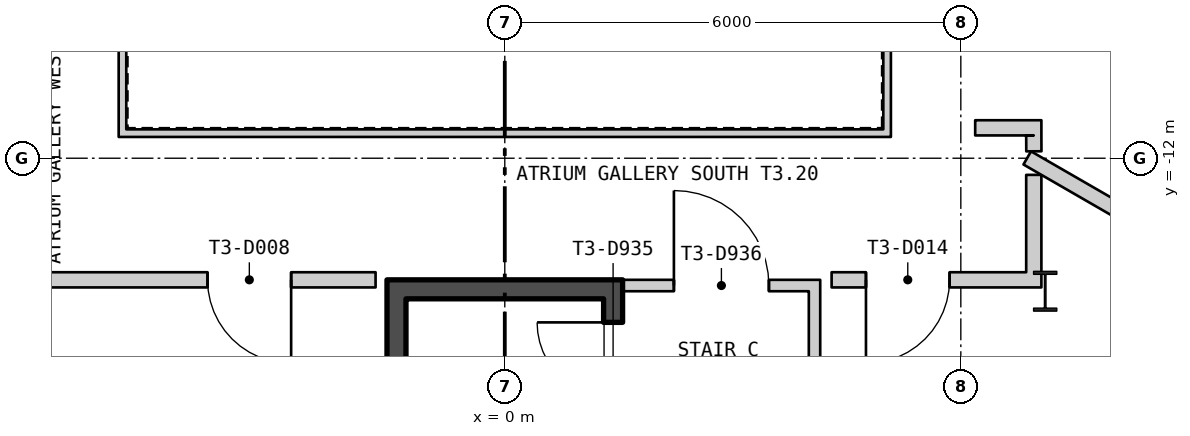
"""IFC4 building model, lengths in metres.
Left out: names, types, materials, properties, quantities, classifications, styles, units other than length and angle.
Written with IfcOpenShell. Run it as: python <this file> out.ifc"""

import sys

from ifc_helpers import new_model, si_unit, direction, frame, frame_2d, origin, origin_2d, place, context, subcontext, project, spatial, polyline, rectangle, i_section, outline, extrude, element, fill, save


model = new_model("IFC4")
c1 = context("Model", 3, precision=1e-05, world=origin(), true_north=direction((0.0, 1.0)))
c2 = subcontext(c1, "Body", "Model", "MODEL_VIEW")
j1 = project(units=[si_unit("LENGTHUNIT", "METRE"), si_unit("PLANEANGLEUNIT", "RADIAN")], contexts=[c1])
p1 = place(None, origin())
s1 = spatial("IfcSite", under=j1, at=p1, CompositionType="ELEMENT")
p2 = place(p1, origin())
s2 = spatial("IfcBuilding", under=s1, at=p2, CompositionType="ELEMENT")
p3 = place(p2, frame((0.0, 0.0, 186.6)))
s3 = spatial("IfcBuildingStorey", under=s2, at=p3, CompositionType="ELEMENT", Elevation=186.6)
p4 = place(p3, frame((7.11, -13.75, 0.0), z_axis=(0.0, 0.0, 1.0), x_axis=(1.0, 0.0, 0.0)))
e1 = element("IfcColumn", 1, at=p4, inside=s3, PredefinedType="COLUMN", context=c2, shape_type="SweptSolid", body=[
    extrude(i_section(OverallWidth=0.306, OverallDepth=0.524, WebThickness=0.021, FlangeThickness=0.04, at=origin_2d()), origin(), (0.0, 0.0, 1.0), 6.0),
])
p5 = place(p3, frame((-26.67, 13.393, -0.18), z_axis=(0.0, 0.0, 1.0), x_axis=(0.500000711659, -0.866024992908, 0.0)))
e2 = element("IfcWall", 2, at=p5, inside=s3, PredefinedType="SOLIDWALL", context=c2, shape_type="SweptSolid", body=[
    extrude(outline(polyline([(-0.13, -0.225), (45.87, -0.225), (45.61, 0.225), (0.13, 0.225), (-0.13, -0.225)])), origin(), (0.0, 0.0, 1.0), 6.0),
])
p6 = place(p5, frame((1.424, 0.0, 1.38)))
e3 = element("IfcOpeningElement", 3, at=p6, cuts=e2, PredefinedType="OPENING", context=c2, shape_type="SweptSolid", body=[
    extrude(rectangle(XDim=2.4, YDim=3.6, at=frame_2d((1.2, 1.8))), frame((0.0, 0.235, 0.0), z_axis=(0.0, -1.0, 0.0), x_axis=(1.0, 0.0, 0.0)), (0.0, 0.0, 1.0), 0.47),
])
p7 = place(p5, frame((5.893, 0.0, 1.38)))
e4 = element("IfcOpeningElement", 4, at=p7, cuts=e2, PredefinedType="OPENING", context=c2, shape_type="SweptSolid", body=[
    extrude(rectangle(XDim=2.4, YDim=3.6, at=frame_2d((1.2, 1.8))), frame((0.0, 0.235, 0.0), z_axis=(0.0, -1.0, 0.0), x_axis=(1.0, 0.0, 0.0)), (0.0, 0.0, 1.0), 0.47),
])
p8 = place(p5, frame((10.401, 0.0, 1.38)))
e5 = element("IfcOpeningElement", 5, at=p8, cuts=e2, PredefinedType="OPENING", context=c2, shape_type="SweptSolid", body=[
    extrude(rectangle(XDim=2.4, YDim=3.6, at=frame_2d((1.2, 1.8))), frame((0.0, 0.235, 0.0), z_axis=(0.0, -1.0, 0.0), x_axis=(1.0, 0.0, 0.0)), (0.0, 0.0, 1.0), 0.47),
])
p9 = place(p5, frame((14.909, 0.0, 1.38)))
e6 = element("IfcOpeningElement", 6, at=p9, cuts=e2, PredefinedType="OPENING", context=c2, shape_type="SweptSolid", body=[
    extrude(rectangle(XDim=2.4, YDim=3.6, at=frame_2d((1.2, 1.8))), frame((0.0, 0.235, 0.0), z_axis=(0.0, -1.0, 0.0), x_axis=(1.0, 0.0, 0.0)), (0.0, 0.0, 1.0), 0.47),
])
p10 = place(p5, frame((19.416, 0.0, 1.38)))
e7 = element("IfcOpeningElement", 7, at=p10, cuts=e2, PredefinedType="OPENING", context=c2, shape_type="SweptSolid", body=[
    extrude(rectangle(XDim=2.4, YDim=3.6, at=frame_2d((1.2, 1.8))), frame((0.0, 0.235, 0.0), z_axis=(0.0, -1.0, 0.0), x_axis=(1.0, 0.0, 0.0)), (0.0, 0.0, 1.0), 0.47),
])
p11 = place(p5, frame((23.924, 0.0, 1.38)))
e8 = element("IfcOpeningElement", 8, at=p11, cuts=e2, PredefinedType="OPENING", context=c2, shape_type="SweptSolid", body=[
    extrude(rectangle(XDim=2.4, YDim=3.6, at=frame_2d((1.2, 1.8))), frame((0.0, 0.235, 0.0), z_axis=(0.0, -1.0, 0.0), x_axis=(1.0, 0.0, 0.0)), (0.0, 0.0, 1.0), 0.47),
])
p12 = place(p5, frame((28.431, 0.0, 1.38)))
e9 = element("IfcOpeningElement", 9, at=p12, cuts=e2, PredefinedType="OPENING", context=c2, shape_type="SweptSolid", body=[
    extrude(rectangle(XDim=2.4, YDim=3.6, at=frame_2d((1.2, 1.8))), frame((0.0, 0.235, 0.0), z_axis=(0.0, -1.0, 0.0), x_axis=(1.0, 0.0, 0.0)), (0.0, 0.0, 1.0), 0.47),
])
p13 = place(p5, frame((32.939, 0.0, 1.38)))
e10 = element("IfcOpeningElement", 10, at=p13, cuts=e2, PredefinedType="OPENING", context=c2, shape_type="SweptSolid", body=[
    extrude(rectangle(XDim=2.4, YDim=3.6, at=frame_2d((1.2, 1.8))), frame((0.0, 0.235, 0.0), z_axis=(0.0, -1.0, 0.0), x_axis=(1.0, 0.0, 0.0)), (0.0, 0.0, 1.0), 0.47),
])
p14 = place(p5, frame((37.447, 0.0, 1.38)))
e11 = element("IfcOpeningElement", 11, at=p14, cuts=e2, PredefinedType="OPENING", context=c2, shape_type="SweptSolid", body=[
    extrude(rectangle(XDim=2.4, YDim=3.6, at=frame_2d((1.2, 1.8))), frame((0.0, 0.235, 0.0), z_axis=(0.0, -1.0, 0.0), x_axis=(1.0, 0.0, 0.0)), (0.0, 0.0, 1.0), 0.47),
])
p15 = place(p5, frame((41.916, 0.0, 1.38)))
e12 = element("IfcOpeningElement", 12, at=p15, cuts=e2, PredefinedType="OPENING", context=c2, shape_type="SweptSolid", body=[
    extrude(rectangle(XDim=2.4, YDim=3.6, at=frame_2d((1.2, 1.8))), frame((0.0, 0.235, 0.0), z_axis=(0.0, -1.0, 0.0), x_axis=(1.0, 0.0, 0.0)), (0.0, 0.0, 1.0), 0.47),
])
p16 = place(p3, frame((3.8, -26.219, -0.18), z_axis=(0.0, 0.0, 1.0), x_axis=(0.500000711659, 0.866024992908, 0.0)))
e13 = element("IfcWall", 13, at=p16, inside=s3, PredefinedType="SOLIDWALL", context=c2, shape_type="SweptSolid", body=[
    extrude(outline(polyline([(-0.13, -0.225), (45.87, -0.225), (45.61, 0.225), (0.13, 0.225), (-0.13, -0.225)])), origin(), (0.0, 0.0, 1.0), 6.0),
])
p17 = place(p16, frame((1.424, 0.0, 1.38)))
e14 = element("IfcOpeningElement", 14, at=p17, cuts=e13, PredefinedType="OPENING", context=c2, shape_type="SweptSolid", body=[
    extrude(rectangle(XDim=2.4, YDim=3.6, at=frame_2d((1.2, 1.8))), frame((0.0, 0.235, 0.0), z_axis=(0.0, -1.0, 0.0), x_axis=(1.0, 0.0, 0.0)), (0.0, 0.0, 1.0), 0.47),
])
p18 = place(p16, frame((5.893, 0.0, 1.38)))
e15 = element("IfcOpeningElement", 15, at=p18, cuts=e13, PredefinedType="OPENING", context=c2, shape_type="SweptSolid", body=[
    extrude(rectangle(XDim=2.4, YDim=3.6, at=frame_2d((1.2, 1.8))), frame((0.0, 0.235, 0.0), z_axis=(0.0, -1.0, 0.0), x_axis=(1.0, 0.0, 0.0)), (0.0, 0.0, 1.0), 0.47),
])
p19 = place(p16, frame((10.401, 0.0, 1.38)))
e16 = element("IfcOpeningElement", 16, at=p19, cuts=e13, PredefinedType="OPENING", context=c2, shape_type="SweptSolid", body=[
    extrude(rectangle(XDim=2.4, YDim=3.6, at=frame_2d((1.2, 1.8))), frame((0.0, 0.235, 0.0), z_axis=(0.0, -1.0, 0.0), x_axis=(1.0, 0.0, 0.0)), (0.0, 0.0, 1.0), 0.47),
])
p20 = place(p16, frame((14.909, 0.0, 1.38)))
e17 = element("IfcOpeningElement", 17, at=p20, cuts=e13, PredefinedType="OPENING", context=c2, shape_type="SweptSolid", body=[
    extrude(rectangle(XDim=2.4, YDim=3.6, at=frame_2d((1.2, 1.8))), frame((0.0, 0.235, 0.0), z_axis=(0.0, -1.0, 0.0), x_axis=(1.0, 0.0, 0.0)), (0.0, 0.0, 1.0), 0.47),
])
p21 = place(p16, frame((19.416, 0.0, 1.38)))
e18 = element("IfcOpeningElement", 18, at=p21, cuts=e13, PredefinedType="OPENING", context=c2, shape_type="SweptSolid", body=[
    extrude(rectangle(XDim=2.4, YDim=3.6, at=frame_2d((1.2, 1.8))), frame((0.0, 0.235, 0.0), z_axis=(0.0, -1.0, 0.0), x_axis=(1.0, 0.0, 0.0)), (0.0, 0.0, 1.0), 0.47),
])
p22 = place(p16, frame((23.924, 0.0, 1.38)))
e19 = element("IfcOpeningElement", 19, at=p22, cuts=e13, PredefinedType="OPENING", context=c2, shape_type="SweptSolid", body=[
    extrude(rectangle(XDim=2.4, YDim=3.6, at=frame_2d((1.2, 1.8))), frame((0.0, 0.235, 0.0), z_axis=(0.0, -1.0, 0.0), x_axis=(1.0, 0.0, 0.0)), (0.0, 0.0, 1.0), 0.47),
])
p23 = place(p16, frame((28.431, 0.0, 1.38)))
e20 = element("IfcOpeningElement", 20, at=p23, cuts=e13, PredefinedType="OPENING", context=c2, shape_type="SweptSolid", body=[
    extrude(rectangle(XDim=2.4, YDim=3.6, at=frame_2d((1.2, 1.8))), frame((0.0, 0.235, 0.0), z_axis=(0.0, -1.0, 0.0), x_axis=(1.0, 0.0, 0.0)), (0.0, 0.0, 1.0), 0.47),
])
p24 = place(p16, frame((32.939, 0.0, 1.38)))
e21 = element("IfcOpeningElement", 21, at=p24, cuts=e13, PredefinedType="OPENING", context=c2, shape_type="SweptSolid", body=[
    extrude(rectangle(XDim=2.4, YDim=3.6, at=frame_2d((1.2, 1.8))), frame((0.0, 0.235, 0.0), z_axis=(0.0, -1.0, 0.0), x_axis=(1.0, 0.0, 0.0)), (0.0, 0.0, 1.0), 0.47),
])
p25 = place(p16, frame((37.447, 0.0, 1.38)))
e22 = element("IfcOpeningElement", 22, at=p25, cuts=e13, PredefinedType="OPENING", context=c2, shape_type="SweptSolid", body=[
    extrude(rectangle(XDim=2.4, YDim=3.6, at=frame_2d((1.2, 1.8))), frame((0.0, 0.235, 0.0), z_axis=(0.0, -1.0, 0.0), x_axis=(1.0, 0.0, 0.0)), (0.0, 0.0, 1.0), 0.47),
])
p26 = place(p16, frame((41.916, 0.0, 1.38)))
e23 = element("IfcOpeningElement", 23, at=p26, cuts=e13, PredefinedType="OPENING", context=c2, shape_type="SweptSolid", body=[
    extrude(rectangle(XDim=2.4, YDim=3.6, at=frame_2d((1.2, 1.8))), frame((0.0, 0.235, 0.0), z_axis=(0.0, -1.0, 0.0), x_axis=(1.0, 0.0, 0.0)), (0.0, 0.0, 1.0), 0.47),
])
p27 = place(p3, frame((-5.08, -11.67, 0.0), z_axis=(0.0, 0.0, 1.0), x_axis=(1.0, 0.0, 0.0)))
e24 = element("IfcWall", 24, at=p27, inside=s3, PredefinedType="PARTITIONING", context=c2, shape_type="SweptSolid", body=[
    extrude(rectangle(XDim=10.16, YDim=0.1, at=frame_2d((5.08, 0.0))), origin(), (0.0, 0.0, 1.0), 5.8),
])
for number, where, z_axis, x_axis in (
    (25, (5.03, -11.62, 0.0), (0.0, 0.0, 1.0), (0.0, 1.0, 0.0)),
    (26, (-5.03, -3.58, 0.0), (0.0, 0.0, 1.0), (0.0, -1.0, 0.0)),
):
    element("IfcWall", number, at=place(p3, frame(where, z_axis=z_axis, x_axis=x_axis)), inside=s3, PredefinedType="PARTITIONING", context=c2, shape_type="SweptSolid", body=[
        extrude(rectangle(XDim=8.04, YDim=0.1, at=frame_2d((4.02, 0.0))), origin(), (0.0, 0.0, 1.0), 5.8),
    ])
p28 = place(p3, frame((-1.425, -21.05, 0.0), z_axis=(0.0, 0.0, 1.0), x_axis=(0.0, 1.0, 0.0)))
e27 = element("IfcWall", 27, at=p28, inside=s3, PredefinedType="SHEAR", context=c2, shape_type="SweptSolid", body=[
    extrude(rectangle(XDim=7.2, YDim=0.25, at=frame_2d((3.6, 0.0))), origin(), (0.0, 0.0, 1.0), 5.8),
])
p29 = place(p3, frame((1.425, -21.05, 0.0), z_axis=(0.0, 0.0, 1.0), x_axis=(0.0, 1.0, 0.0)))
e28 = element("IfcWall", 28, at=p29, inside=s3, PredefinedType="SHEAR", context=c2, shape_type="SweptSolid", body=[
    extrude(rectangle(XDim=7.2, YDim=0.25, at=frame_2d((3.6, 0.0))), origin(), (0.0, 0.0, 1.0), 5.8),
])
p30 = place(p29, frame((5.89, 0.0, 0.0)))
e29 = element("IfcOpeningElement", 29, at=p30, cuts=e28, PredefinedType="OPENING", context=c2, shape_type="SweptSolid", body=[
    extrude(rectangle(XDim=1.0, YDim=2.1, at=frame_2d((0.5, 1.05))), frame((0.0, 0.135, 0.0), z_axis=(0.0, -1.0, 0.0), x_axis=(1.0, 0.0, 0.0)), (0.0, 0.0, 1.0), 0.27),
])
p31 = place(p3, frame((-1.55, -13.725, 0.0), z_axis=(0.0, 0.0, 1.0), x_axis=(1.0, 0.0, 0.0)))
e30 = element("IfcWall", 30, at=p31, inside=s3, PredefinedType="SHEAR", context=c2, shape_type="SweptSolid", body=[
    extrude(rectangle(XDim=3.1, YDim=0.25, at=frame_2d((1.55, 0.0))), origin(), (0.0, 0.0, 1.0), 5.8),
])
p32 = place(p3, frame((4.075, -16.15, 0.0), z_axis=(0.0, 0.0, 1.0), x_axis=(0.0, 1.0, 0.0)))
e31 = element("IfcWall", 31, at=p32, inside=s3, PredefinedType="PARTITIONING", context=c2, shape_type="SweptSolid", body=[
    extrude(rectangle(XDim=2.4, YDim=0.15, at=frame_2d((1.2, 0.0))), origin(), (0.0, 0.0, 1.0), 5.8),
])
p33 = place(p3, frame((1.55, -13.675, 0.0), z_axis=(0.0, 0.0, 1.0), x_axis=(1.0, 0.0, 0.0)))
e32 = element("IfcWall", 32, at=p33, inside=s3, PredefinedType="PARTITIONING", context=c2, shape_type="SweptSolid", body=[
    extrude(rectangle(XDim=2.6, YDim=0.15, at=frame_2d((1.3, 0.0))), origin(), (0.0, 0.0, 1.0), 5.01),
])
p34 = place(p33, frame((0.675, 0.0, 0.0)))
e33 = element("IfcOpeningElement", 33, at=p34, cuts=e32, PredefinedType="OPENING", context=c2, shape_type="SweptSolid", body=[
    extrude(rectangle(XDim=1.25, YDim=2.1, at=frame_2d((0.625, 1.05))), frame((0.0, 0.085, 0.0), z_axis=(0.0, -1.0, 0.0), x_axis=(1.0, 0.0, 0.0)), (0.0, 0.0, 1.0), 0.17),
])
p35 = place(p3, frame((-6.86, -13.6, 0.0), z_axis=(0.0, 0.0, 1.0), x_axis=(1.0, 0.0, 0.0)))
e34 = element("IfcWall", 34, at=p35, inside=s3, PredefinedType="PARTITIONING", context=c2, shape_type="SweptSolid", body=[
    extrude(rectangle(XDim=5.16, YDim=0.2, at=frame_2d((2.58, 0.0))), origin(), (0.0, 0.0, 1.0), 5.01),
])
p36 = place(p35, frame((2.949, 0.0, 0.0)))
e35 = element("IfcOpeningElement", 35, at=p36, cuts=e34, PredefinedType="OPENING", context=c2, shape_type="SweptSolid", body=[
    extrude(rectangle(XDim=1.1, YDim=2.1, at=frame_2d((0.55, 1.05))), frame((0.0, 0.11, 0.0), z_axis=(0.0, -1.0, 0.0), x_axis=(1.0, 0.0, 0.0)), (0.0, 0.0, 1.0), 0.22),
])
p37 = place(p3, frame((4.3, -13.6, 0.0), z_axis=(0.0, 0.0, 1.0), x_axis=(1.0, 0.0, 0.0)))
e36 = element("IfcWall", 36, at=p37, inside=s3, PredefinedType="PARTITIONING", context=c2, shape_type="SweptSolid", body=[
    extrude(rectangle(XDim=2.76, YDim=0.2, at=frame_2d((1.38, 0.0))), origin(), (0.0, 0.0, 1.0), 5.01),
])
p38 = place(p37, frame((0.452, 0.0, 0.0)))
e37 = element("IfcOpeningElement", 37, at=p38, cuts=e36, PredefinedType="OPENING", context=c2, shape_type="SweptSolid", body=[
    extrude(rectangle(XDim=1.1, YDim=2.1, at=frame_2d((0.55, 1.05))), frame((0.0, 0.11, 0.0), z_axis=(0.0, -1.0, 0.0), x_axis=(1.0, 0.0, 0.0)), (0.0, 0.0, 1.0), 0.22),
])
p39 = place(p3, frame((6.189, -11.6, 0.0), z_axis=(0.0, 0.0, 1.0), x_axis=(1.0, 0.0, 0.0)))
e38 = element("IfcWall", 38, at=p39, inside=s3, PredefinedType="PARTITIONING", context=c2, shape_type="SweptSolid", body=[
    extrude(rectangle(XDim=0.871, YDim=0.2, at=frame_2d((0.435, 0.0))), origin(), (0.0, 0.0, 1.0), 5.8),
])
p40 = place(p3, frame((6.874, -11.996, 0.0), z_axis=(0.0, 0.0, 1.0), x_axis=(0.866181174779, -0.499730099612, 0.0)))
e39 = element("IfcWall", 39, at=p40, inside=s3, PredefinedType="PARTITIONING", context=c2, shape_type="SweptSolid", body=[
    extrude(rectangle(XDim=3.774, YDim=0.2, at=frame_2d((1.887, 0.0))), origin(), (0.0, 0.0, 1.0), 5.8),
])
p41 = place(p3, frame((6.96, -13.5, 0.0), z_axis=(0.0, 0.0, 1.0), x_axis=(0.0, 1.0, 0.0)))
e40 = element("IfcWall", 40, at=p41, inside=s3, PredefinedType="PARTITIONING", context=c2, shape_type="SweptSolid", body=[
    extrude(rectangle(XDim=1.281, YDim=0.2, at=frame_2d((0.64, 0.0))), origin(), (0.0, 0.0, 1.0), 5.21),
])
p42 = place(p3, frame((6.96, -11.7, 0.0), z_axis=(0.0, 0.0, 1.0), x_axis=(0.004784634228, -0.999988553572, 0.0)))
e41 = element("IfcWall", 41, at=p42, inside=s3, PredefinedType="PARTITIONING", context=c2, shape_type="SweptSolid", body=[
    extrude(rectangle(XDim=0.209, YDim=0.2, at=frame_2d((0.104, 0.0))), origin(), (0.0, 0.0, 1.0), 5.8),
])
p43 = place(p30, origin())
e42 = element("IfcDoor", 42, at=p43, inside=s3, OperationType="SINGLE_SWING_LEFT", PredefinedType="DOOR", context=c2, shape_type="SweptSolid", body=[
    extrude(rectangle(XDim=1.0, YDim=2.1, at=frame_2d((0.5, 1.05))), frame((0.0, 0.025, 0.0), z_axis=(0.0, -1.0, 0.0), x_axis=(1.0, 0.0, 0.0)), (0.0, 0.0, 1.0), 0.05),
])
fill(e29, e42)
p44 = place(p34, origin())
e43 = element("IfcDoor", 43, at=p44, inside=s3, OperationType="SINGLE_SWING_RIGHT", PredefinedType="DOOR", context=c2, shape_type="SweptSolid", body=[
    extrude(rectangle(XDim=1.25, YDim=2.1, at=frame_2d((0.625, 1.05))), frame((0.0, 0.025, 0.0), z_axis=(0.0, -1.0, 0.0), x_axis=(1.0, 0.0, 0.0)), (0.0, 0.0, 1.0), 0.05),
])
fill(e33, e43)
p45 = place(p36, origin())
e44 = element("IfcDoor", 44, at=p45, inside=s3, OperationType="SINGLE_SWING_RIGHT", PredefinedType="DOOR", context=c2, shape_type="SweptSolid", body=[
    extrude(rectangle(XDim=1.1, YDim=2.1, at=frame_2d((0.55, 1.05))), frame((0.0, 0.025, 0.0), z_axis=(0.0, -1.0, 0.0), x_axis=(1.0, 0.0, 0.0)), (0.0, 0.0, 1.0), 0.05),
])
fill(e35, e44)
p46 = place(p38, origin())
e45 = element("IfcDoor", 45, at=p46, inside=s3, OperationType="SINGLE_SWING_LEFT", PredefinedType="DOOR", context=c2, shape_type="SweptSolid", body=[
    extrude(rectangle(XDim=1.1, YDim=2.1, at=frame_2d((0.55, 1.05))), frame((0.0, 0.025, 0.0), z_axis=(0.0, -1.0, 0.0), x_axis=(1.0, 0.0, 0.0)), (0.0, 0.0, 1.0), 0.05),
])
fill(e37, e45)
save(model, sys.argv[1])
